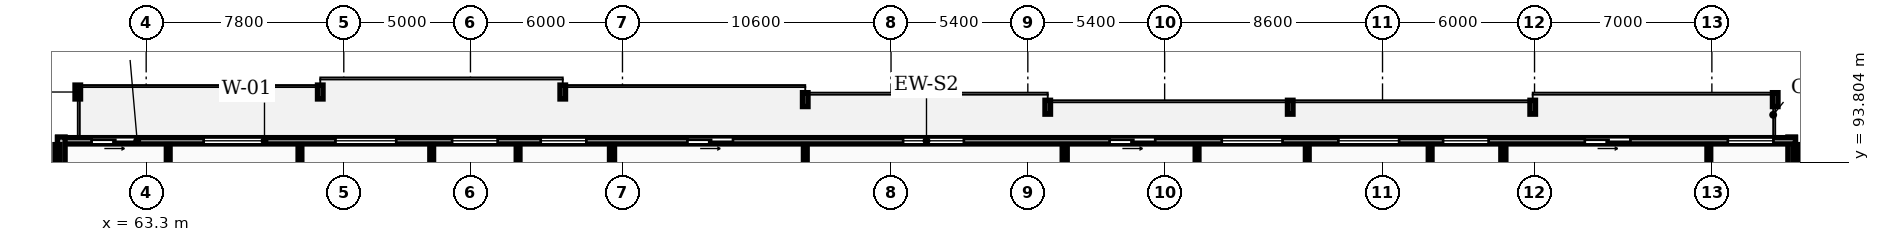
"""IFC4 building model, lengths in metres.
Left out: names, types, materials, properties, quantities, classifications, styles, units other than length and angle.
Written with IfcOpenShell. Run it as: python <this file> out.ifc"""

import sys

from ifc_helpers import new_model, si_unit, direction, frame, frame_2d, origin, place, context, subcontext, project, spatial, rectangle, extrude, element, fill, save


model = new_model("IFC4")
c1 = context("Model", 3, precision=1e-05, world=origin(), true_north=direction((0.0, 1.0)))
c2 = subcontext(c1, "Body", "Model", "MODEL_VIEW")
j1 = project(units=[si_unit("LENGTHUNIT", "METRE"), si_unit("PLANEANGLEUNIT", "RADIAN")], contexts=[c1])
p1 = place(None, origin())
s1 = spatial("IfcSite", under=j1, at=p1, CompositionType="ELEMENT")
p2 = place(p1, origin())
s2 = spatial("IfcBuilding", under=s1, at=p2, CompositionType="ELEMENT")
p3 = place(p2, frame((0.0, 0.0, 235.55)))
s3 = spatial("IfcBuildingStorey", under=s2, at=p3, CompositionType="ELEMENT", Elevation=235.55)
p4 = place(p3, frame((128.25, 91.2, 0.0), z_axis=(0.0, 0.0, 1.0), x_axis=(0.0, 1.0, 0.0)))
e1 = element("IfcWall", 1, at=p4, inside=s3, PredefinedType="STANDARD", context=c2, shape_type="SweptSolid", body=[
    extrude(rectangle(XDim=3.6, YDim=0.3, at=frame_2d((1.8, 0.0))), origin(), (0.0, 0.0, 1.0), 3.17),
])
p5 = place(p3, frame((128.4, 94.65, 0.0), z_axis=(0.0, 0.0, 1.0), x_axis=(-1.0, 0.0, 0.0)))
e2 = element("IfcWall", 2, at=p5, inside=s3, PredefinedType="STANDARD", context=c2, shape_type="SweptSolid", body=[
    extrude(rectangle(XDim=68.6, YDim=0.25, at=frame_2d((34.3, 0.0))), origin(), (0.0, 0.0, 1.0), 3.17),
])
p6 = place(p5, frame((60.43, 0.0, 0.85)))
e3 = element("IfcOpeningElement", 3, at=p6, cuts=e2, PredefinedType="OPENING", context=c2, shape_type="SweptSolid", body=[
    extrude(rectangle(XDim=2.4, YDim=1.9, at=frame_2d((1.2, 0.95))), frame((0.0, 0.135, 0.0), z_axis=(0.0, -1.0, 0.0), x_axis=(1.0, 0.0, 0.0)), (0.0, 0.0, 1.0), 0.27),
])
p7 = place(p5, frame((55.23, 0.0, 0.85)))
e4 = element("IfcOpeningElement", 4, at=p7, cuts=e2, PredefinedType="OPENING", context=c2, shape_type="SweptSolid", body=[
    extrude(rectangle(XDim=2.4, YDim=1.9, at=frame_2d((1.2, 0.95))), frame((0.0, 0.135, 0.0), z_axis=(0.0, -1.0, 0.0), x_axis=(1.0, 0.0, 0.0)), (0.0, 0.0, 1.0), 0.27),
])
p8 = place(p5, frame((51.225, 0.0, 0.85)))
e5 = element("IfcOpeningElement", 5, at=p8, cuts=e2, PredefinedType="OPENING", context=c2, shape_type="SweptSolid", body=[
    extrude(rectangle(XDim=1.8, YDim=1.8, at=frame_2d((0.9, 0.9))), frame((0.0, 0.135, 0.0), z_axis=(0.0, -1.0, 0.0), x_axis=(1.0, 0.0, 0.0)), (0.0, 0.0, 1.0), 0.27),
])
p9 = place(p5, frame((65.455, 0.0, 0.0)))
e6 = element("IfcOpeningElement", 6, at=p9, cuts=e2, PredefinedType="OPENING", context=c2, shape_type="SweptSolid", body=[
    extrude(rectangle(XDim=1.8, YDim=2.2, at=frame_2d((0.9, 1.1))), frame((0.0, 0.135, 0.0), z_axis=(0.0, -1.0, 0.0), x_axis=(1.0, 0.0, 0.0)), (0.0, 0.0, 1.0), 0.27),
])
p10 = place(p5, frame((47.726, 0.0, 0.85)))
e7 = element("IfcOpeningElement", 7, at=p10, cuts=e2, PredefinedType="OPENING", context=c2, shape_type="SweptSolid", body=[
    extrude(rectangle(XDim=1.8, YDim=1.8, at=frame_2d((0.9, 0.9))), frame((0.0, 0.135, 0.0), z_axis=(0.0, -1.0, 0.0), x_axis=(1.0, 0.0, 0.0)), (0.0, 0.0, 1.0), 0.27),
])
p11 = place(p5, frame((41.938, 0.0, 0.0)))
e8 = element("IfcOpeningElement", 8, at=p11, cuts=e2, PredefinedType="OPENING", context=c2, shape_type="SweptSolid", body=[
    extrude(rectangle(XDim=1.8, YDim=2.2, at=frame_2d((0.9, 1.1))), frame((0.0, 0.135, 0.0), z_axis=(0.0, -1.0, 0.0), x_axis=(1.0, 0.0, 0.0)), (0.0, 0.0, 1.0), 0.27),
])
p12 = place(p5, frame((32.824, 0.0, 0.85)))
e9 = element("IfcOpeningElement", 9, at=p12, cuts=e2, PredefinedType="OPENING", context=c2, shape_type="SweptSolid", body=[
    extrude(rectangle(XDim=2.4, YDim=1.9, at=frame_2d((1.2, 0.95))), frame((0.0, 0.135, 0.0), z_axis=(0.0, -1.0, 0.0), x_axis=(1.0, 0.0, 0.0)), (0.0, 0.0, 1.0), 0.27),
])
p13 = place(p5, frame((20.245, 0.0, 0.85)))
e10 = element("IfcOpeningElement", 10, at=p13, cuts=e2, PredefinedType="OPENING", context=c2, shape_type="SweptSolid", body=[
    extrude(rectangle(XDim=2.4, YDim=1.9, at=frame_2d((1.2, 0.95))), frame((0.0, 0.135, 0.0), z_axis=(0.0, -1.0, 0.0), x_axis=(1.0, 0.0, 0.0)), (0.0, 0.0, 1.0), 0.27),
])
p14 = place(p5, frame((15.645, 0.0, 0.85)))
e11 = element("IfcOpeningElement", 11, at=p14, cuts=e2, PredefinedType="OPENING", context=c2, shape_type="SweptSolid", body=[
    extrude(rectangle(XDim=2.4, YDim=1.9, at=frame_2d((1.2, 0.95))), frame((0.0, 0.135, 0.0), z_axis=(0.0, -1.0, 0.0), x_axis=(1.0, 0.0, 0.0)), (0.0, 0.0, 1.0), 0.27),
])
p15 = place(p5, frame((25.272, 0.0, 0.0)))
e12 = element("IfcOpeningElement", 12, at=p15, cuts=e2, PredefinedType="OPENING", context=c2, shape_type="SweptSolid", body=[
    extrude(rectangle(XDim=1.8, YDim=2.2, at=frame_2d((0.9, 1.1))), frame((0.0, 0.135, 0.0), z_axis=(0.0, -1.0, 0.0), x_axis=(1.0, 0.0, 0.0)), (0.0, 0.0, 1.0), 0.27),
])
p16 = place(p5, frame((12.11, 0.0, 0.85)))
e13 = element("IfcOpeningElement", 13, at=p16, cuts=e2, PredefinedType="OPENING", context=c2, shape_type="SweptSolid", body=[
    extrude(rectangle(XDim=1.8, YDim=1.8, at=frame_2d((0.9, 0.9))), frame((0.0, 0.135, 0.0), z_axis=(0.0, -1.0, 0.0), x_axis=(1.0, 0.0, 0.0)), (0.0, 0.0, 1.0), 0.27),
])
p17 = place(p5, frame((6.515, 0.0, 0.0)))
e14 = element("IfcOpeningElement", 14, at=p17, cuts=e2, PredefinedType="OPENING", context=c2, shape_type="SweptSolid", body=[
    extrude(rectangle(XDim=1.8, YDim=2.2, at=frame_2d((0.9, 1.1))), frame((0.0, 0.135, 0.0), z_axis=(0.0, -1.0, 0.0), x_axis=(1.0, 0.0, 0.0)), (0.0, 0.0, 1.0), 0.27),
])
p18 = place(p5, frame((0.87, 0.0, 0.85)))
e15 = element("IfcOpeningElement", 15, at=p18, cuts=e2, PredefinedType="OPENING", context=c2, shape_type="SweptSolid", body=[
    extrude(rectangle(XDim=1.8, YDim=1.8, at=frame_2d((0.9, 0.9))), frame((0.0, 0.135, 0.0), z_axis=(0.0, -1.0, 0.0), x_axis=(1.0, 0.0, 0.0)), (0.0, 0.0, 1.0), 0.27),
])
p19 = place(p3, frame((59.95, 94.8, 0.0), z_axis=(0.0, 0.0, 1.0), x_axis=(0.0, -1.0, 0.0)))
e16 = element("IfcWall", 16, at=p19, inside=s3, PredefinedType="STANDARD", context=c2, shape_type="SweptSolid", body=[
    extrude(rectangle(XDim=3.6, YDim=0.3, at=frame_2d((1.8, 0.0))), origin(), (0.0, 0.0, 1.0), 3.17),
])
for number, where, z_axis, x_axis in (
    (17, (59.8, 70.18, 0.0), (0.0, 0.0, 1.0), (0.0, 1.0, 0.0)),
    (18, (128.4, 70.18, 0.0), (0.0, 0.0, 1.0), (0.0, 1.0, 0.0)),
):
    element("IfcWall", number, at=place(p3, frame(where, z_axis=z_axis, x_axis=x_axis)), inside=s3, PredefinedType="PARTITIONING", context=c2, shape_type="SweptSolid", body=[
        extrude(rectangle(XDim=24.32, YDim=0.2, at=frame_2d((12.16, 0.0))), origin(), (0.0, 0.0, 1.0), 2.477),
    ])
p20 = place(p3, frame((81.687, 70.18, 0.0), z_axis=(0.0, 0.0, 1.0), x_axis=(0.0, 1.0, 0.0)))
e19 = element("IfcWall", 19, at=p20, inside=s3, PredefinedType="PARTITIONING", context=c2, shape_type="SweptSolid", body=[
    extrude(rectangle(XDim=24.32, YDim=0.2, at=frame_2d((12.16, 0.0))), origin(), (0.0, 0.0, 1.0), 3.17),
])
for number, where, z_axis, x_axis in (
    (20, (69.37, 89.33, 0.0), (0.0, 0.0, 1.0), (0.0, 1.0, 0.0)),
    (21, (74.57, 89.33, 0.0), (0.0, 0.0, 1.0), (0.0, 1.0, 0.0)),
):
    element("IfcWall", number, at=place(p3, frame(where, z_axis=z_axis, x_axis=x_axis)), inside=s3, PredefinedType="PARTITIONING", context=c2, shape_type="SweptSolid", body=[
        extrude(rectangle(XDim=5.17, YDim=0.15, at=frame_2d((2.585, 0.0))), origin(), (0.0, 0.0, 1.0), 3.17),
    ])
p21 = place(p3, frame((64.17, 84.19, 0.0), z_axis=(0.0, 0.0, 1.0), x_axis=(0.0, 1.0, 0.0)))
e22 = element("IfcWall", 22, at=p21, inside=s3, PredefinedType="PARTITIONING", context=c2, shape_type="SweptSolid", body=[
    extrude(rectangle(XDim=10.31, YDim=0.15, at=frame_2d((5.155, 0.0))), origin(), (0.0, 0.0, 1.0), 3.17),
])
p22 = place(p21, frame((3.82, 0.0, 0.0)))
e23 = element("IfcOpeningElement", 23, at=p22, cuts=e22, PredefinedType="OPENING", context=c2, shape_type="SweptSolid", body=[
    extrude(rectangle(XDim=0.92, YDim=2.08, at=frame_2d((0.46, 1.04))), frame((0.0, 0.085, 0.0), z_axis=(0.0, -1.0, 0.0), x_axis=(1.0, 0.0, 0.0)), (0.0, 0.0, 1.0), 0.17),
])
p23 = place(p3, frame((77.98, 86.81, 0.0), z_axis=(0.0, 0.0, 1.0), x_axis=(0.0, 1.0, 0.0)))
e24 = element("IfcWall", 24, at=p23, inside=s3, PredefinedType="PARTITIONING", context=c2, shape_type="SweptSolid", body=[
    extrude(rectangle(XDim=7.69, YDim=0.15, at=frame_2d((3.845, 0.0))), origin(), (0.0, 0.0, 1.0), 3.17),
])
p24 = place(p23, frame((1.2, 0.0, 0.0)))
e25 = element("IfcOpeningElement", 25, at=p24, cuts=e24, PredefinedType="OPENING", context=c2, shape_type="SweptSolid", body=[
    extrude(rectangle(XDim=0.92, YDim=2.08, at=frame_2d((0.46, 1.04))), frame((0.0, 0.085, 0.0), z_axis=(0.0, -1.0, 0.0), x_axis=(1.0, 0.0, 0.0)), (0.0, 0.0, 1.0), 0.17),
])
p25 = place(p3, frame((99.556, 70.18, 0.0), z_axis=(0.0, 0.0, 1.0), x_axis=(0.0, 1.0, 0.0)))
e26 = element("IfcWall", 26, at=p25, inside=s3, PredefinedType="PARTITIONING", context=c2, shape_type="SweptSolid", body=[
    extrude(rectangle(XDim=24.32, YDim=0.2, at=frame_2d((12.16, 0.0))), origin(), (0.0, 0.0, 1.0), 3.17),
])
p26 = place(p3, frame((89.316, 89.33, 0.0), z_axis=(0.0, 0.0, 1.0), x_axis=(0.0, 1.0, 0.0)))
e27 = element("IfcWall", 27, at=p26, inside=s3, PredefinedType="PARTITIONING", context=c2, shape_type="SweptSolid", body=[
    extrude(rectangle(XDim=5.17, YDim=0.15, at=frame_2d((2.585, 0.0))), origin(), (0.0, 0.0, 1.0), 3.17),
])
p27 = place(p3, frame((116.87, 70.18, 0.0), z_axis=(0.0, 0.0, 1.0), x_axis=(0.0, 1.0, 0.0)))
e28 = element("IfcWall", 28, at=p27, inside=s3, PredefinedType="PARTITIONING", context=c2, shape_type="SweptSolid", body=[
    extrude(rectangle(XDim=24.32, YDim=0.2, at=frame_2d((12.16, 0.0))), origin(), (0.0, 0.0, 1.0), 3.17),
])
p28 = place(p3, frame((109.13, 89.33, 0.0), z_axis=(0.0, 0.0, 1.0), x_axis=(0.0, 1.0, 0.0)))
e29 = element("IfcWall", 29, at=p28, inside=s3, PredefinedType="PARTITIONING", context=c2, shape_type="SweptSolid", body=[
    extrude(rectangle(XDim=5.17, YDim=0.15, at=frame_2d((2.585, 0.0))), origin(), (0.0, 0.0, 1.0), 3.17),
])
p29 = place(p3, frame((104.78, 84.19, 0.0), z_axis=(0.0, 0.0, 1.0), x_axis=(0.0, 1.0, 0.0)))
e30 = element("IfcWall", 30, at=p29, inside=s3, PredefinedType="PARTITIONING", context=c2, shape_type="SweptSolid", body=[
    extrude(rectangle(XDim=10.31, YDim=0.15, at=frame_2d((5.155, 0.0))), origin(), (0.0, 0.0, 1.0), 3.17),
])
p30 = place(p29, frame((3.82, 0.0, 0.0)))
e31 = element("IfcOpeningElement", 31, at=p30, cuts=e30, PredefinedType="OPENING", context=c2, shape_type="SweptSolid", body=[
    extrude(rectangle(XDim=0.92, YDim=2.08, at=frame_2d((0.46, 1.04))), frame((0.0, 0.085, 0.0), z_axis=(0.0, -1.0, 0.0), x_axis=(1.0, 0.0, 0.0)), (0.0, 0.0, 1.0), 0.17),
])
p31 = place(p3, frame((113.98, 86.92, 0.0), z_axis=(0.0, 0.0, 1.0), x_axis=(0.0, 1.0, 0.0)))
e32 = element("IfcWall", 32, at=p31, inside=s3, PredefinedType="PARTITIONING", context=c2, shape_type="SweptSolid", body=[
    extrude(rectangle(XDim=7.58, YDim=0.15, at=frame_2d((3.79, 0.0))), origin(), (0.0, 0.0, 1.0), 3.17),
])
p32 = place(p31, frame((1.09, 0.0, 0.0)))
e33 = element("IfcOpeningElement", 33, at=p32, cuts=e32, PredefinedType="OPENING", context=c2, shape_type="SweptSolid", body=[
    extrude(rectangle(XDim=0.92, YDim=2.08, at=frame_2d((0.46, 1.04))), frame((0.0, 0.085, 0.0), z_axis=(0.0, -1.0, 0.0), x_axis=(1.0, 0.0, 0.0)), (0.0, 0.0, 1.0), 0.17),
])
p33 = place(p3, frame((124.98, 84.19, 0.0), z_axis=(0.0, 0.0, 1.0), x_axis=(0.0, 1.0, 0.0)))
e34 = element("IfcWall", 34, at=p33, inside=s3, PredefinedType="PARTITIONING", context=c2, shape_type="SweptSolid", body=[
    extrude(rectangle(XDim=10.31, YDim=0.15, at=frame_2d((5.155, 0.0))), origin(), (0.0, 0.0, 1.0), 3.17),
])
p34 = place(p33, frame((1.43, 0.0, 0.0)))
e35 = element("IfcOpeningElement", 35, at=p34, cuts=e34, PredefinedType="OPENING", context=c2, shape_type="SweptSolid", body=[
    extrude(rectangle(XDim=0.84, YDim=2.04, at=frame_2d((0.42, 1.02))), frame((0.0, 0.085, 0.0), z_axis=(0.0, -1.0, 0.0), x_axis=(1.0, 0.0, 0.0)), (0.0, 0.0, 1.0), 0.17),
])
p35 = place(p33, frame((3.92, 0.0, 0.0)))
e36 = element("IfcOpeningElement", 36, at=p35, cuts=e34, PredefinedType="OPENING", context=c2, shape_type="SweptSolid", body=[
    extrude(rectangle(XDim=0.84, YDim=2.04, at=frame_2d((0.42, 1.02))), frame((0.0, 0.085, 0.0), z_axis=(0.0, -1.0, 0.0), x_axis=(1.0, 0.0, 0.0)), (0.0, 0.0, 1.0), 0.17),
])
p36 = place(p33, frame((5.48, 0.0, 0.0)))
e37 = element("IfcOpeningElement", 37, at=p36, cuts=e34, PredefinedType="OPENING", context=c2, shape_type="SweptSolid", body=[
    extrude(rectangle(XDim=0.88, YDim=2.06, at=frame_2d((0.44, 1.03))), frame((0.0, 0.085, 0.0), z_axis=(0.0, -1.0, 0.0), x_axis=(1.0, 0.0, 0.0)), (0.0, 0.0, 1.0), 0.17),
])
p37 = place(p6, origin())
e38 = element("IfcWindow", 38, at=p37, inside=s3, PartitioningType="DOUBLE_PANEL_VERTICAL", PredefinedType="WINDOW", context=c2, shape_type="SweptSolid", body=[
    extrude(rectangle(XDim=2.4, YDim=1.9, at=frame_2d((1.2, 0.95))), frame((0.0, 0.03, 0.0), z_axis=(0.0, -1.0, 0.0), x_axis=(1.0, 0.0, 0.0)), (0.0, 0.0, 1.0), 0.06),
])
fill(e3, e38)
p38 = place(p7, origin())
e39 = element("IfcWindow", 39, at=p38, inside=s3, PartitioningType="DOUBLE_PANEL_VERTICAL", PredefinedType="WINDOW", context=c2, shape_type="SweptSolid", body=[
    extrude(rectangle(XDim=2.4, YDim=1.9, at=frame_2d((1.2, 0.95))), frame((0.0, 0.03, 0.0), z_axis=(0.0, -1.0, 0.0), x_axis=(1.0, 0.0, 0.0)), (0.0, 0.0, 1.0), 0.06),
])
fill(e4, e39)
p39 = place(p8, origin())
e40 = element("IfcWindow", 40, at=p39, inside=s3, PartitioningType="SINGLE_PANEL", PredefinedType="WINDOW", context=c2, shape_type="SweptSolid", body=[
    extrude(rectangle(XDim=1.8, YDim=1.8, at=frame_2d((0.9, 0.9))), frame((0.0, 0.03, 0.0), z_axis=(0.0, -1.0, 0.0), x_axis=(1.0, 0.0, 0.0)), (0.0, 0.0, 1.0), 0.06),
])
fill(e5, e40)
p40 = place(p9, origin())
e41 = element("IfcDoor", 41, at=p40, inside=s3, OperationType="SLIDING_TO_LEFT", PredefinedType="DOOR", context=c2, shape_type="SweptSolid", body=[
    extrude(rectangle(XDim=1.8, YDim=2.2, at=frame_2d((0.9, 1.1))), frame((0.0, 0.025, 0.0), z_axis=(0.0, -1.0, 0.0), x_axis=(1.0, 0.0, 0.0)), (0.0, 0.0, 1.0), 0.05),
])
fill(e6, e41)
p41 = place(p10, origin())
e42 = element("IfcWindow", 42, at=p41, inside=s3, PartitioningType="SINGLE_PANEL", PredefinedType="WINDOW", context=c2, shape_type="SweptSolid", body=[
    extrude(rectangle(XDim=1.8, YDim=1.8, at=frame_2d((0.9, 0.9))), frame((0.0, 0.03, 0.0), z_axis=(0.0, -1.0, 0.0), x_axis=(1.0, 0.0, 0.0)), (0.0, 0.0, 1.0), 0.06),
])
fill(e7, e42)
p42 = place(p11, origin())
e43 = element("IfcDoor", 43, at=p42, inside=s3, OperationType="SLIDING_TO_LEFT", PredefinedType="DOOR", context=c2, shape_type="SweptSolid", body=[
    extrude(rectangle(XDim=1.8, YDim=2.2, at=frame_2d((0.9, 1.1))), frame((0.0, 0.025, 0.0), z_axis=(0.0, -1.0, 0.0), x_axis=(1.0, 0.0, 0.0)), (0.0, 0.0, 1.0), 0.05),
])
fill(e8, e43)
p43 = place(p12, origin())
e44 = element("IfcWindow", 44, at=p43, inside=s3, PartitioningType="DOUBLE_PANEL_VERTICAL", PredefinedType="WINDOW", context=c2, shape_type="SweptSolid", body=[
    extrude(rectangle(XDim=2.4, YDim=1.9, at=frame_2d((1.2, 0.95))), frame((0.0, 0.03, 0.0), z_axis=(0.0, -1.0, 0.0), x_axis=(1.0, 0.0, 0.0)), (0.0, 0.0, 1.0), 0.06),
])
fill(e9, e44)
p44 = place(p13, origin())
e45 = element("IfcWindow", 45, at=p44, inside=s3, PartitioningType="DOUBLE_PANEL_VERTICAL", PredefinedType="WINDOW", context=c2, shape_type="SweptSolid", body=[
    extrude(rectangle(XDim=2.4, YDim=1.9, at=frame_2d((1.2, 0.95))), frame((0.0, 0.03, 0.0), z_axis=(0.0, -1.0, 0.0), x_axis=(1.0, 0.0, 0.0)), (0.0, 0.0, 1.0), 0.06),
])
fill(e10, e45)
p45 = place(p14, origin())
e46 = element("IfcWindow", 46, at=p45, inside=s3, PartitioningType="DOUBLE_PANEL_VERTICAL", PredefinedType="WINDOW", context=c2, shape_type="SweptSolid", body=[
    extrude(rectangle(XDim=2.4, YDim=1.9, at=frame_2d((1.2, 0.95))), frame((0.0, 0.03, 0.0), z_axis=(0.0, -1.0, 0.0), x_axis=(1.0, 0.0, 0.0)), (0.0, 0.0, 1.0), 0.06),
])
fill(e11, e46)
p46 = place(p15, origin())
e47 = element("IfcDoor", 47, at=p46, inside=s3, OperationType="SLIDING_TO_LEFT", PredefinedType="DOOR", context=c2, shape_type="SweptSolid", body=[
    extrude(rectangle(XDim=1.8, YDim=2.2, at=frame_2d((0.9, 1.1))), frame((0.0, 0.025, 0.0), z_axis=(0.0, -1.0, 0.0), x_axis=(1.0, 0.0, 0.0)), (0.0, 0.0, 1.0), 0.05),
])
fill(e12, e47)
p47 = place(p16, origin())
e48 = element("IfcWindow", 48, at=p47, inside=s3, PartitioningType="SINGLE_PANEL", PredefinedType="WINDOW", context=c2, shape_type="SweptSolid", body=[
    extrude(rectangle(XDim=1.8, YDim=1.8, at=frame_2d((0.9, 0.9))), frame((0.0, 0.03, 0.0), z_axis=(0.0, -1.0, 0.0), x_axis=(1.0, 0.0, 0.0)), (0.0, 0.0, 1.0), 0.06),
])
fill(e13, e48)
p48 = place(p17, origin())
e49 = element("IfcDoor", 49, at=p48, inside=s3, OperationType="SLIDING_TO_LEFT", PredefinedType="DOOR", context=c2, shape_type="SweptSolid", body=[
    extrude(rectangle(XDim=1.8, YDim=2.2, at=frame_2d((0.9, 1.1))), frame((0.0, 0.025, 0.0), z_axis=(0.0, -1.0, 0.0), x_axis=(1.0, 0.0, 0.0)), (0.0, 0.0, 1.0), 0.05),
])
fill(e14, e49)
p49 = place(p18, origin())
e50 = element("IfcWindow", 50, at=p49, inside=s3, PartitioningType="SINGLE_PANEL", PredefinedType="WINDOW", context=c2, shape_type="SweptSolid", body=[
    extrude(rectangle(XDim=1.8, YDim=1.8, at=frame_2d((0.9, 0.9))), frame((0.0, 0.03, 0.0), z_axis=(0.0, -1.0, 0.0), x_axis=(1.0, 0.0, 0.0)), (0.0, 0.0, 1.0), 0.06),
])
fill(e15, e50)
save(model, sys.argv[1])
